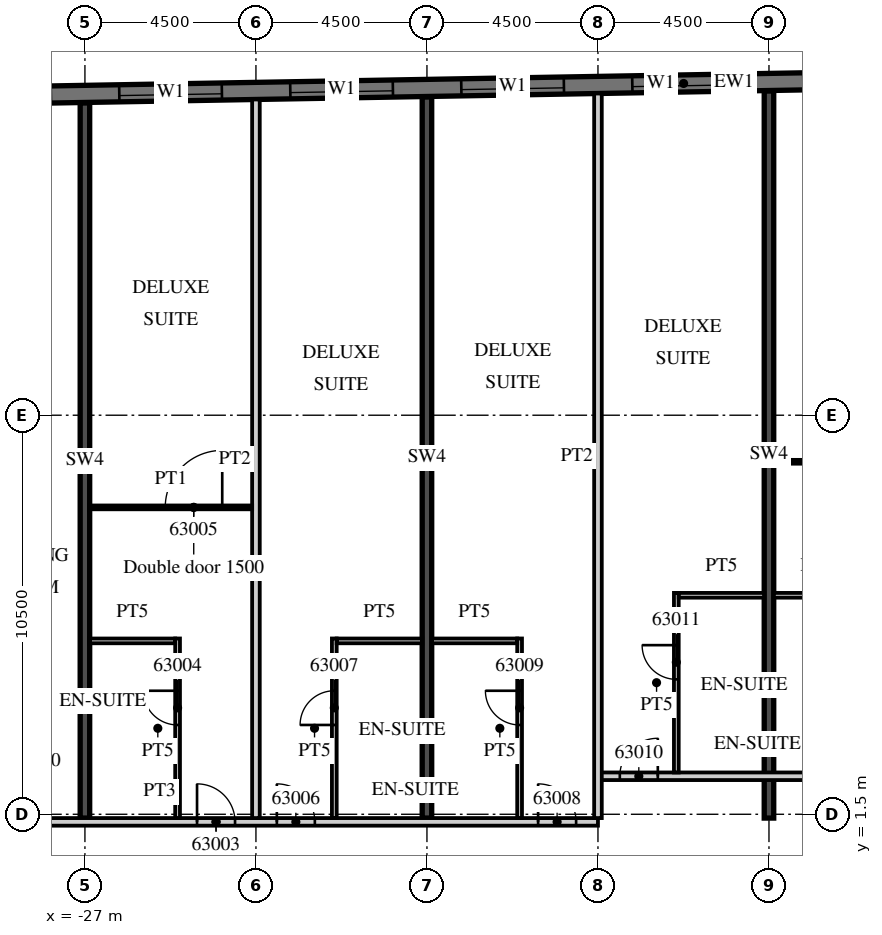
"""IFC4 building model, lengths in metres.
Left out: names, types, materials, properties, quantities, classifications, styles, units other than length and angle.
Written with IfcOpenShell. Run it as: python <this file> out.ifc"""

import sys

from ifc_helpers import new_model, si_unit, direction, frame, frame_2d, origin, place, context, subcontext, project, spatial, rectangle, extrude, element, fill, save


model = new_model("IFC4")
c1 = context("Model", 3, precision=1e-05, world=origin(), true_north=direction((0.0, 1.0)))
c2 = subcontext(c1, "Body", "Model", "MODEL_VIEW")
j1 = project(units=[si_unit("LENGTHUNIT", "METRE"), si_unit("PLANEANGLEUNIT", "RADIAN")], contexts=[c1])
p1 = place(None, origin())
s1 = spatial("IfcSite", under=j1, at=p1, CompositionType="ELEMENT")
p2 = place(p1, origin())
s2 = spatial("IfcBuilding", under=s1, at=p2, CompositionType="ELEMENT")
p3 = place(p2, frame((0.0, 0.0, 254.0)))
s3 = spatial("IfcBuildingStorey", under=s2, at=p3, CompositionType="ELEMENT", Elevation=254.0)
p4 = place(p3, frame((-27.0, 1.4, 0.0), z_axis=(0.0, 0.0, 1.0), x_axis=(0.0, 1.0, 0.0)))
e1 = element("IfcWall", 1, at=p4, inside=s3, PredefinedType="SHEAR", context=c2, shape_type="SweptSolid", body=[
    extrude(rectangle(XDim=18.817, YDim=0.25, at=frame_2d((9.409, 0.0))), origin(), (0.0, 0.0, 1.0), 3.0),
])
p5 = place(p3, frame((-18.0, 1.4, 0.0), z_axis=(0.0, 0.0, 1.0), x_axis=(0.0, 1.0, 0.0)))
e2 = element("IfcWall", 2, at=p5, inside=s3, PredefinedType="SHEAR", context=c2, shape_type="SweptSolid", body=[
    extrude(rectangle(XDim=18.974, YDim=0.25, at=frame_2d((9.487, 0.0))), origin(), (0.0, 0.0, 1.0), 3.0),
])
p6 = place(p3, frame((-9.0, 1.4, 0.0), z_axis=(0.0, 0.0, 1.0), x_axis=(0.0, 1.0, 0.0)))
e3 = element("IfcWall", 3, at=p6, inside=s3, PredefinedType="SHEAR", context=c2, shape_type="SweptSolid", body=[
    extrude(rectangle(XDim=19.132, YDim=0.25, at=frame_2d((9.566, 0.0))), origin(), (0.0, 0.0, 1.0), 3.0),
])
p7 = place(p3, frame((13.504, 21.161, 0.0), z_axis=(0.0, 0.0, 1.0), x_axis=(-0.999847763257, -0.017448504532, 0.0)))
e4 = element("IfcWall", 4, at=p7, inside=s3, PredefinedType="SOLIDWALL", context=c2, shape_type="SweptSolid", body=[
    extrude(rectangle(XDim=46.859, YDim=0.45, at=frame_2d((23.43, 0.0))), origin(), (0.0, 0.0, 1.0), 3.0),
])
p8 = place(p7, frame((0.9, 0.0, 0.45)))
e5 = element("IfcOpeningElement", 5, at=p8, cuts=e4, PredefinedType="OPENING", context=c2, shape_type="SweptSolid", body=[
    extrude(rectangle(XDim=2.7, YDim=2.25, at=frame_2d((1.35, 1.125))), frame((0.0, 0.235, 0.0), z_axis=(0.0, -1.0, 0.0), x_axis=(1.0, 0.0, 0.0)), (0.0, 0.0, 1.0), 0.47),
])
p9 = place(p7, frame((5.401, 0.0, 0.45)))
e6 = element("IfcOpeningElement", 6, at=p9, cuts=e4, PredefinedType="OPENING", context=c2, shape_type="SweptSolid", body=[
    extrude(rectangle(XDim=2.7, YDim=2.25, at=frame_2d((1.35, 1.125))), frame((0.0, 0.235, 0.0), z_axis=(0.0, -1.0, 0.0), x_axis=(1.0, 0.0, 0.0)), (0.0, 0.0, 1.0), 0.47),
])
p10 = place(p7, frame((9.902, 0.0, 0.45)))
e7 = element("IfcOpeningElement", 7, at=p10, cuts=e4, PredefinedType="OPENING", context=c2, shape_type="SweptSolid", body=[
    extrude(rectangle(XDim=2.7, YDim=2.25, at=frame_2d((1.35, 1.125))), frame((0.0, 0.235, 0.0), z_axis=(0.0, -1.0, 0.0), x_axis=(1.0, 0.0, 0.0)), (0.0, 0.0, 1.0), 0.47),
])
p11 = place(p7, frame((14.402, 0.0, 0.45)))
e8 = element("IfcOpeningElement", 8, at=p11, cuts=e4, PredefinedType="OPENING", context=c2, shape_type="SweptSolid", body=[
    extrude(rectangle(XDim=2.7, YDim=2.25, at=frame_2d((1.35, 1.125))), frame((0.0, 0.235, 0.0), z_axis=(0.0, -1.0, 0.0), x_axis=(1.0, 0.0, 0.0)), (0.0, 0.0, 1.0), 0.47),
])
p12 = place(p7, frame((18.903, 0.0, 0.45)))
e9 = element("IfcOpeningElement", 9, at=p12, cuts=e4, PredefinedType="OPENING", context=c2, shape_type="SweptSolid", body=[
    extrude(rectangle(XDim=2.7, YDim=2.25, at=frame_2d((1.35, 1.125))), frame((0.0, 0.235, 0.0), z_axis=(0.0, -1.0, 0.0), x_axis=(1.0, 0.0, 0.0)), (0.0, 0.0, 1.0), 0.47),
])
p13 = place(p7, frame((23.404, 0.0, 0.45)))
e10 = element("IfcOpeningElement", 10, at=p13, cuts=e4, PredefinedType="OPENING", context=c2, shape_type="SweptSolid", body=[
    extrude(rectangle(XDim=2.7, YDim=2.25, at=frame_2d((1.35, 1.125))), frame((0.0, 0.235, 0.0), z_axis=(0.0, -1.0, 0.0), x_axis=(1.0, 0.0, 0.0)), (0.0, 0.0, 1.0), 0.47),
])
p14 = place(p7, frame((27.904, 0.0, 0.45)))
e11 = element("IfcOpeningElement", 11, at=p14, cuts=e4, PredefinedType="OPENING", context=c2, shape_type="SweptSolid", body=[
    extrude(rectangle(XDim=2.7, YDim=2.25, at=frame_2d((1.35, 1.125))), frame((0.0, 0.235, 0.0), z_axis=(0.0, -1.0, 0.0), x_axis=(1.0, 0.0, 0.0)), (0.0, 0.0, 1.0), 0.47),
])
p15 = place(p7, frame((32.405, 0.0, 0.45)))
e12 = element("IfcOpeningElement", 12, at=p15, cuts=e4, PredefinedType="OPENING", context=c2, shape_type="SweptSolid", body=[
    extrude(rectangle(XDim=2.7, YDim=2.25, at=frame_2d((1.35, 1.125))), frame((0.0, 0.235, 0.0), z_axis=(0.0, -1.0, 0.0), x_axis=(1.0, 0.0, 0.0)), (0.0, 0.0, 1.0), 0.47),
])
p16 = place(p7, frame((36.906, 0.0, 0.45)))
e13 = element("IfcOpeningElement", 13, at=p16, cuts=e4, PredefinedType="OPENING", context=c2, shape_type="SweptSolid", body=[
    extrude(rectangle(XDim=2.7, YDim=2.25, at=frame_2d((1.35, 1.125))), frame((0.0, 0.235, 0.0), z_axis=(0.0, -1.0, 0.0), x_axis=(1.0, 0.0, 0.0)), (0.0, 0.0, 1.0), 0.47),
])
p17 = place(p7, frame((41.406, 0.0, 0.45)))
e14 = element("IfcOpeningElement", 14, at=p17, cuts=e4, PredefinedType="OPENING", context=c2, shape_type="SweptSolid", body=[
    extrude(rectangle(XDim=2.7, YDim=2.25, at=frame_2d((1.35, 1.125))), frame((0.0, 0.235, 0.0), z_axis=(0.0, -1.0, 0.0), x_axis=(1.0, 0.0, 0.0)), (0.0, 0.0, 1.0), 0.47),
])
p18 = place(p3, frame((-36.566, 1.3, 0.0), z_axis=(0.0, 0.0, 1.0), x_axis=(1.0, 0.0, 0.0)))
e15 = element("IfcWall", 15, at=p18, inside=s3, PredefinedType="PARTITIONING", context=c2, shape_type="SweptSolid", body=[
    extrude(rectangle(XDim=23.066, YDim=0.2, at=frame_2d((11.533, 0.0))), origin(), (0.0, 0.0, 1.0), 3.0),
])
p19 = place(p18, frame((5.929, 0.0, 0.0)))
e16 = element("IfcOpeningElement", 16, at=p19, cuts=e15, PredefinedType="OPENING", context=c2, shape_type="SweptSolid", body=[
    extrude(rectangle(XDim=1.2, YDim=2.1, at=frame_2d((0.6, 1.05))), frame((0.0, 0.11, 0.0), z_axis=(0.0, -1.0, 0.0), x_axis=(1.0, 0.0, 0.0)), (0.0, 0.0, 1.0), 0.22),
])
p20 = place(p18, frame((12.516, 0.0, 0.0)))
e17 = element("IfcOpeningElement", 17, at=p20, cuts=e15, PredefinedType="OPENING", context=c2, shape_type="SweptSolid", body=[
    extrude(rectangle(XDim=1.0, YDim=2.1, at=frame_2d((0.5, 1.05))), frame((0.0, 0.11, 0.0), z_axis=(0.0, -1.0, 0.0), x_axis=(1.0, 0.0, 0.0)), (0.0, 0.0, 1.0), 0.22),
])
p21 = place(p18, frame((14.616, 0.0, 0.0)))
e18 = element("IfcOpeningElement", 18, at=p21, cuts=e15, PredefinedType="OPENING", context=c2, shape_type="SweptSolid", body=[
    extrude(rectangle(XDim=1.0, YDim=2.1, at=frame_2d((0.5, 1.05))), frame((0.0, 0.11, 0.0), z_axis=(0.0, -1.0, 0.0), x_axis=(1.0, 0.0, 0.0)), (0.0, 0.0, 1.0), 0.22),
])
p22 = place(p18, frame((21.491, 0.0, 0.0)))
e19 = element("IfcOpeningElement", 19, at=p22, cuts=e15, PredefinedType="OPENING", context=c2, shape_type="SweptSolid", body=[
    extrude(rectangle(XDim=1.0, YDim=2.1, at=frame_2d((0.5, 1.05))), frame((0.0, 0.11, 0.0), z_axis=(0.0, -1.0, 0.0), x_axis=(1.0, 0.0, 0.0)), (0.0, 0.0, 1.0), 0.22),
])
p23 = place(p3, frame((-13.5, 2.5, 0.0), z_axis=(0.0, 0.0, 1.0), x_axis=(1.0, 0.0, 0.0)))
e20 = element("IfcWall", 20, at=p23, inside=s3, PredefinedType="PARTITIONING", context=c2, shape_type="SweptSolid", body=[
    extrude(rectangle(XDim=27.0, YDim=0.2, at=frame_2d((13.5, 0.0))), origin(), (0.0, 0.0, 1.0), 3.0),
])
p24 = place(p23, frame((0.575, 0.0, 0.0)))
e21 = element("IfcOpeningElement", 21, at=p24, cuts=e20, PredefinedType="OPENING", context=c2, shape_type="SweptSolid", body=[
    extrude(rectangle(XDim=1.0, YDim=2.1, at=frame_2d((0.5, 1.05))), frame((0.0, 0.11, 0.0), z_axis=(0.0, -1.0, 0.0), x_axis=(1.0, 0.0, 0.0)), (0.0, 0.0, 1.0), 0.22),
])
p25 = place(p23, frame((7.45, 0.0, 0.0)))
e22 = element("IfcOpeningElement", 22, at=p25, cuts=e20, PredefinedType="OPENING", context=c2, shape_type="SweptSolid", body=[
    extrude(rectangle(XDim=1.0, YDim=2.1, at=frame_2d((0.5, 1.05))), frame((0.0, 0.11, 0.0), z_axis=(0.0, -1.0, 0.0), x_axis=(1.0, 0.0, 0.0)), (0.0, 0.0, 1.0), 0.22),
])
p26 = place(p23, frame((11.925, 0.0, 0.0)))
e23 = element("IfcOpeningElement", 23, at=p26, cuts=e20, PredefinedType="OPENING", context=c2, shape_type="SweptSolid", body=[
    extrude(rectangle(XDim=1.0, YDim=2.1, at=frame_2d((0.5, 1.05))), frame((0.0, 0.11, 0.0), z_axis=(0.0, -1.0, 0.0), x_axis=(1.0, 0.0, 0.0)), (0.0, 0.0, 1.0), 0.22),
])
p27 = place(p23, frame((18.862, 0.0, 0.0)))
e24 = element("IfcOpeningElement", 24, at=p27, cuts=e20, PredefinedType="OPENING", context=c2, shape_type="SweptSolid", body=[
    extrude(rectangle(XDim=1.2, YDim=2.1, at=frame_2d((0.6, 1.05))), frame((0.0, 0.11, 0.0), z_axis=(0.0, -1.0, 0.0), x_axis=(1.0, 0.0, 0.0)), (0.0, 0.0, 1.0), 0.22),
])
p28 = place(p23, frame((23.075, 0.0, 0.0)))
e25 = element("IfcOpeningElement", 25, at=p28, cuts=e20, PredefinedType="OPENING", context=c2, shape_type="SweptSolid", body=[
    extrude(rectangle(XDim=1.0, YDim=2.1, at=frame_2d((0.5, 1.05))), frame((0.0, 0.11, 0.0), z_axis=(0.0, -1.0, 0.0), x_axis=(1.0, 0.0, 0.0)), (0.0, 0.0, 1.0), 0.22),
])
p29 = place(p3, frame((-22.5, 1.4, 0.0), z_axis=(0.0, 0.0, 1.0), x_axis=(0.0, 1.0, 0.0)))
e26 = element("IfcWall", 26, at=p29, inside=s3, PredefinedType="PARTITIONING", context=c2, shape_type="SweptSolid", body=[
    extrude(rectangle(XDim=18.908, YDim=0.2, at=frame_2d((9.454, 0.0))), origin(), (0.0, 0.0, 1.0), 3.0),
])
p30 = place(p3, frame((-24.562, 1.4, 0.0), z_axis=(0.0, 0.0, 1.0), x_axis=(0.0, 1.0, 0.0)))
e27 = element("IfcWall", 27, at=p30, inside=s3, PredefinedType="PARTITIONING", context=c2, shape_type="SweptSolid", body=[
    extrude(rectangle(XDim=4.725, YDim=0.125, at=frame_2d((2.363, 0.0))), origin(), (0.0, 0.0, 1.0), 3.0),
])
p31 = place(p30, frame((2.45, 0.0, 0.0)))
e28 = element("IfcOpeningElement", 28, at=p31, cuts=e27, PredefinedType="OPENING", context=c2, shape_type="SweptSolid", body=[
    extrude(rectangle(XDim=0.9, YDim=2.1, at=frame_2d((0.45, 1.05))), frame((0.0, 0.073, 0.0), z_axis=(0.0, -1.0, 0.0), x_axis=(1.0, 0.0, 0.0)), (0.0, 0.0, 1.0), 0.145),
])
p32 = place(p3, frame((-26.875, 6.062, 0.0), z_axis=(0.0, 0.0, 1.0), x_axis=(1.0, 0.0, 0.0)))
e29 = element("IfcWall", 29, at=p32, inside=s3, PredefinedType="PARTITIONING", context=c2, shape_type="SweptSolid", body=[
    extrude(rectangle(XDim=2.25, YDim=0.125, at=frame_2d((1.125, 0.0))), origin(), (0.0, 0.0, 1.0), 3.0),
])
p33 = place(p3, frame((-26.875, 9.575, 0.0), z_axis=(0.0, 0.0, 1.0), x_axis=(1.0, 0.0, 0.0)))
e30 = element("IfcWall", 30, at=p33, inside=s3, PredefinedType="PARTITIONING", context=c2, shape_type="SweptSolid", body=[
    extrude(rectangle(XDim=4.275, YDim=0.1, at=frame_2d((2.137, 0.0))), origin(), (0.0, 0.0, 1.0), 3.0),
])
p34 = place(p33, frame((1.988, 0.0, 0.0)))
e31 = element("IfcOpeningElement", 31, at=p34, cuts=e30, PredefinedType="OPENING", context=c2, shape_type="SweptSolid", body=[
    extrude(rectangle(XDim=1.5, YDim=2.1, at=frame_2d((0.75, 1.05))), frame((0.0, 0.06, 0.0), z_axis=(0.0, -1.0, 0.0), x_axis=(1.0, 0.0, 0.0)), (0.0, 0.0, 1.0), 0.12),
])
p35 = place(p3, frame((-20.438, 1.4, 0.0), z_axis=(0.0, 0.0, 1.0), x_axis=(0.0, 1.0, 0.0)))
e32 = element("IfcWall", 32, at=p35, inside=s3, PredefinedType="PARTITIONING", context=c2, shape_type="SweptSolid", body=[
    extrude(rectangle(XDim=4.725, YDim=0.125, at=frame_2d((2.363, 0.0))), origin(), (0.0, 0.0, 1.0), 3.0),
])
p36 = place(p35, frame((2.45, 0.0, 0.0)))
e33 = element("IfcOpeningElement", 33, at=p36, cuts=e32, PredefinedType="OPENING", context=c2, shape_type="SweptSolid", body=[
    extrude(rectangle(XDim=0.9, YDim=2.1, at=frame_2d((0.45, 1.05))), frame((0.0, 0.073, 0.0), z_axis=(0.0, -1.0, 0.0), x_axis=(1.0, 0.0, 0.0)), (0.0, 0.0, 1.0), 0.145),
])
p37 = place(p3, frame((-20.375, 6.062, 0.0), z_axis=(0.0, 0.0, 1.0), x_axis=(1.0, 0.0, 0.0)))
e34 = element("IfcWall", 34, at=p37, inside=s3, PredefinedType="PARTITIONING", context=c2, shape_type="SweptSolid", body=[
    extrude(rectangle(XDim=2.25, YDim=0.125, at=frame_2d((1.125, 0.0))), origin(), (0.0, 0.0, 1.0), 3.0),
])
p38 = place(p3, frame((-13.5, 1.4, 0.0), z_axis=(0.0, 0.0, 1.0), x_axis=(0.0, 1.0, 0.0)))
e35 = element("IfcWall", 35, at=p38, inside=s3, PredefinedType="PARTITIONING", context=c2, shape_type="SweptSolid", body=[
    extrude(rectangle(XDim=19.065, YDim=0.2, at=frame_2d((9.533, 0.0))), origin(), (0.0, 0.0, 1.0), 3.0),
])
p39 = place(p3, frame((-15.562, 1.4, 0.0), z_axis=(0.0, 0.0, 1.0), x_axis=(0.0, 1.0, 0.0)))
e36 = element("IfcWall", 36, at=p39, inside=s3, PredefinedType="PARTITIONING", context=c2, shape_type="SweptSolid", body=[
    extrude(rectangle(XDim=4.725, YDim=0.125, at=frame_2d((2.363, 0.0))), origin(), (0.0, 0.0, 1.0), 3.0),
])
p40 = place(p39, frame((2.45, 0.0, 0.0)))
e37 = element("IfcOpeningElement", 37, at=p40, cuts=e36, PredefinedType="OPENING", context=c2, shape_type="SweptSolid", body=[
    extrude(rectangle(XDim=0.9, YDim=2.1, at=frame_2d((0.45, 1.05))), frame((0.0, 0.073, 0.0), z_axis=(0.0, -1.0, 0.0), x_axis=(1.0, 0.0, 0.0)), (0.0, 0.0, 1.0), 0.145),
])
p41 = place(p3, frame((-17.875, 6.062, 0.0), z_axis=(0.0, 0.0, 1.0), x_axis=(1.0, 0.0, 0.0)))
e38 = element("IfcWall", 38, at=p41, inside=s3, PredefinedType="PARTITIONING", context=c2, shape_type="SweptSolid", body=[
    extrude(rectangle(XDim=2.25, YDim=0.125, at=frame_2d((1.125, 0.0))), origin(), (0.0, 0.0, 1.0), 3.0),
])
p42 = place(p3, frame((-11.438, 2.6, 0.0), z_axis=(0.0, 0.0, 1.0), x_axis=(0.0, 1.0, 0.0)))
e39 = element("IfcWall", 39, at=p42, inside=s3, PredefinedType="PARTITIONING", context=c2, shape_type="SweptSolid", body=[
    extrude(rectangle(XDim=4.725, YDim=0.125, at=frame_2d((2.362, 0.0))), origin(), (0.0, 0.0, 1.0), 3.0),
])
p43 = place(p42, frame((2.45, 0.0, 0.0)))
e40 = element("IfcOpeningElement", 40, at=p43, cuts=e39, PredefinedType="OPENING", context=c2, shape_type="SweptSolid", body=[
    extrude(rectangle(XDim=0.9, YDim=2.1, at=frame_2d((0.45, 1.05))), frame((0.0, 0.073, 0.0), z_axis=(0.0, -1.0, 0.0), x_axis=(1.0, 0.0, 0.0)), (0.0, 0.0, 1.0), 0.145),
])
for number, where, z_axis, x_axis in (
    (41, (-11.375, 7.262, 0.0), (0.0, 0.0, 1.0), (1.0, 0.0, 0.0)),
    (42, (-8.875, 7.262, 0.0), (0.0, 0.0, 1.0), (1.0, 0.0, 0.0)),
):
    element("IfcWall", number, at=place(p3, frame(where, z_axis=z_axis, x_axis=x_axis)), inside=s3, PredefinedType="PARTITIONING", context=c2, shape_type="SweptSolid", body=[
        extrude(rectangle(XDim=2.25, YDim=0.125, at=frame_2d((1.125, 0.0))), origin(), (0.0, 0.0, 1.0), 3.0),
    ])
p44 = place(p3, frame((-8.875, 10.775, 0.0), z_axis=(0.0, 0.0, 1.0), x_axis=(1.0, 0.0, 0.0)))
e43 = element("IfcWall", 43, at=p44, inside=s3, PredefinedType="PARTITIONING", context=c2, shape_type="SweptSolid", body=[
    extrude(rectangle(XDim=4.275, YDim=0.1, at=frame_2d((2.137, 0.0))), origin(), (0.0, 0.0, 1.0), 3.0),
])
p45 = place(p44, frame((1.987, 0.0, 0.0)))
e44 = element("IfcOpeningElement", 44, at=p45, cuts=e43, PredefinedType="OPENING", context=c2, shape_type="SweptSolid", body=[
    extrude(rectangle(XDim=1.5, YDim=2.1, at=frame_2d((0.75, 1.05))), frame((0.0, 0.06, 0.0), z_axis=(0.0, -1.0, 0.0), x_axis=(1.0, 0.0, 0.0)), (0.0, 0.0, 1.0), 0.12),
])
p46 = place(p13, origin())
e45 = element("IfcWindow", 45, at=p46, inside=s3, PartitioningType="SINGLE_PANEL", PredefinedType="WINDOW", context=c2, shape_type="SweptSolid", body=[
    extrude(rectangle(XDim=2.7, YDim=2.25, at=frame_2d((1.35, 1.125))), frame((0.0, 0.09, 0.0), z_axis=(0.0, -1.0, 0.0), x_axis=(1.0, 0.0, 0.0)), (0.0, 0.0, 1.0), 0.06),
])
fill(e10, e45)
p47 = place(p14, origin())
e46 = element("IfcWindow", 46, at=p47, inside=s3, PartitioningType="SINGLE_PANEL", PredefinedType="WINDOW", context=c2, shape_type="SweptSolid", body=[
    extrude(rectangle(XDim=2.7, YDim=2.25, at=frame_2d((1.35, 1.125))), frame((0.0, 0.09, 0.0), z_axis=(0.0, -1.0, 0.0), x_axis=(1.0, 0.0, 0.0)), (0.0, 0.0, 1.0), 0.06),
])
fill(e11, e46)
p48 = place(p15, origin())
e47 = element("IfcWindow", 47, at=p48, inside=s3, PartitioningType="SINGLE_PANEL", PredefinedType="WINDOW", context=c2, shape_type="SweptSolid", body=[
    extrude(rectangle(XDim=2.7, YDim=2.25, at=frame_2d((1.35, 1.125))), frame((0.0, 0.09, 0.0), z_axis=(0.0, -1.0, 0.0), x_axis=(1.0, 0.0, 0.0)), (0.0, 0.0, 1.0), 0.06),
])
fill(e12, e47)
p49 = place(p16, origin())
e48 = element("IfcWindow", 48, at=p49, inside=s3, PartitioningType="SINGLE_PANEL", PredefinedType="WINDOW", context=c2, shape_type="SweptSolid", body=[
    extrude(rectangle(XDim=2.7, YDim=2.25, at=frame_2d((1.35, 1.125))), frame((0.0, 0.09, 0.0), z_axis=(0.0, -1.0, 0.0), x_axis=(1.0, 0.0, 0.0)), (0.0, 0.0, 1.0), 0.06),
])
fill(e13, e48)
p50 = place(p20, origin())
e49 = element("IfcDoor", 49, at=p50, inside=s3, OperationType="SINGLE_SWING_LEFT", PredefinedType="DOOR", context=c2, shape_type="SweptSolid", body=[
    extrude(rectangle(XDim=1.0, YDim=2.1, at=frame_2d((0.5, 1.05))), frame((0.0, 0.025, 0.0), z_axis=(0.0, -1.0, 0.0), x_axis=(1.0, 0.0, 0.0)), (0.0, 0.0, 1.0), 0.05),
])
fill(e17, e49)
p51 = place(p31, origin())
e50 = element("IfcDoor", 50, at=p51, inside=s3, OperationType="SINGLE_SWING_RIGHT", PredefinedType="DOOR", context=c2, shape_type="SweptSolid", body=[
    extrude(rectangle(XDim=0.9, YDim=2.1, at=frame_2d((0.45, 1.05))), frame((0.0, 0.025, 0.0), z_axis=(0.0, -1.0, 0.0), x_axis=(1.0, 0.0, 0.0)), (0.0, 0.0, 1.0), 0.05),
])
fill(e28, e50)
p52 = place(p34, origin())
e51 = element("IfcDoor", 51, at=p52, inside=s3, OperationType="SINGLE_SWING_RIGHT", PredefinedType="DOOR", context=c2, shape_type="SweptSolid", body=[
    extrude(rectangle(XDim=1.5, YDim=2.1, at=frame_2d((0.75, 1.05))), frame((0.0, 0.025, 0.0), z_axis=(0.0, -1.0, 0.0), x_axis=(1.0, 0.0, 0.0)), (0.0, 0.0, 1.0), 0.05),
])
fill(e31, e51)
p53 = place(p21, origin())
e52 = element("IfcDoor", 52, at=p53, inside=s3, OperationType="SINGLE_SWING_LEFT", PredefinedType="DOOR", context=c2, shape_type="SweptSolid", body=[
    extrude(rectangle(XDim=1.0, YDim=2.1, at=frame_2d((0.5, 1.05))), frame((0.0, 0.025, 0.0), z_axis=(0.0, -1.0, 0.0), x_axis=(1.0, 0.0, 0.0)), (0.0, 0.0, 1.0), 0.05),
])
fill(e18, e52)
p54 = place(p36, origin())
e53 = element("IfcDoor", 53, at=p54, inside=s3, OperationType="SINGLE_SWING_LEFT", PredefinedType="DOOR", context=c2, shape_type="SweptSolid", body=[
    extrude(rectangle(XDim=0.9, YDim=2.1, at=frame_2d((0.45, 1.05))), frame((0.0, 0.025, 0.0), z_axis=(0.0, -1.0, 0.0), x_axis=(1.0, 0.0, 0.0)), (0.0, 0.0, 1.0), 0.05),
])
fill(e33, e53)
p55 = place(p22, origin())
e54 = element("IfcDoor", 54, at=p55, inside=s3, OperationType="SINGLE_SWING_LEFT", PredefinedType="DOOR", context=c2, shape_type="SweptSolid", body=[
    extrude(rectangle(XDim=1.0, YDim=2.1, at=frame_2d((0.5, 1.05))), frame((0.0, 0.025, 0.0), z_axis=(0.0, -1.0, 0.0), x_axis=(1.0, 0.0, 0.0)), (0.0, 0.0, 1.0), 0.05),
])
fill(e19, e54)
p56 = place(p40, origin())
e55 = element("IfcDoor", 55, at=p56, inside=s3, OperationType="SINGLE_SWING_RIGHT", PredefinedType="DOOR", context=c2, shape_type="SweptSolid", body=[
    extrude(rectangle(XDim=0.9, YDim=2.1, at=frame_2d((0.45, 1.05))), frame((0.0, 0.025, 0.0), z_axis=(0.0, -1.0, 0.0), x_axis=(1.0, 0.0, 0.0)), (0.0, 0.0, 1.0), 0.05),
])
fill(e37, e55)
p57 = place(p24, origin())
e56 = element("IfcDoor", 56, at=p57, inside=s3, OperationType="SINGLE_SWING_RIGHT", PredefinedType="DOOR", context=c2, shape_type="SweptSolid", body=[
    extrude(rectangle(XDim=1.0, YDim=2.1, at=frame_2d((0.5, 1.05))), frame((0.0, 0.025, 0.0), z_axis=(0.0, -1.0, 0.0), x_axis=(1.0, 0.0, 0.0)), (0.0, 0.0, 1.0), 0.05),
])
fill(e21, e56)
p58 = place(p43, origin())
e57 = element("IfcDoor", 57, at=p58, inside=s3, OperationType="SINGLE_SWING_RIGHT", PredefinedType="DOOR", context=c2, shape_type="SweptSolid", body=[
    extrude(rectangle(XDim=0.9, YDim=2.1, at=frame_2d((0.45, 1.05))), frame((0.0, 0.025, 0.0), z_axis=(0.0, -1.0, 0.0), x_axis=(1.0, 0.0, 0.0)), (0.0, 0.0, 1.0), 0.05),
])
fill(e40, e57)
save(model, sys.argv[1])
